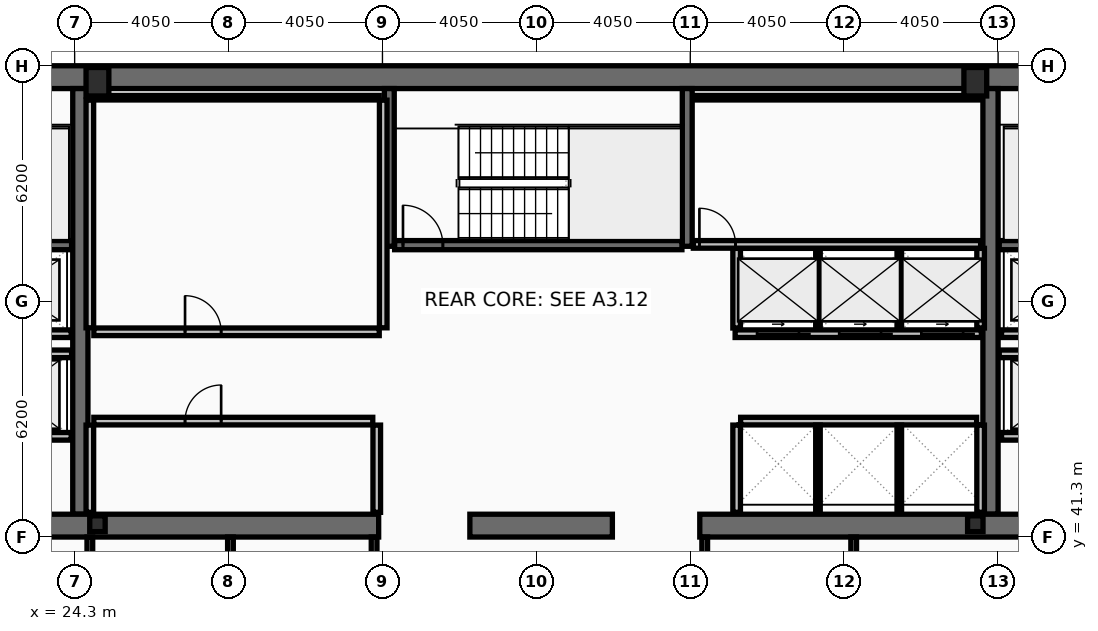
"""IFC4 building model, lengths in metres.
Left out: names, types, materials, properties, quantities, classifications, styles, units other than length and angle.
Written with IfcOpenShell. Run it as: python <this file> out.ifc"""

import sys

from ifc_helpers import new_model, si_unit, direction, frame, frame_2d, origin, origin_2d, place, context, subcontext, project, spatial, rectangle, hollow_rectangle, i_section, extrude, element, fill, save


model = new_model("IFC4")
c1 = context("Model", 3, precision=1e-05, world=origin(), true_north=direction((0.0, 1.0)))
c2 = subcontext(c1, "Body", "Model", "MODEL_VIEW")
j1 = project(units=[si_unit("LENGTHUNIT", "METRE"), si_unit("PLANEANGLEUNIT", "RADIAN")], contexts=[c1])
p1 = place(None, origin())
s1 = spatial("IfcSite", under=j1, at=p1, CompositionType="ELEMENT")
p2 = place(p1, origin())
s2 = spatial("IfcBuilding", under=s1, at=p2, CompositionType="ELEMENT")
p3 = place(p2, frame((0.0, 0.0, 228.2)))
s3 = spatial("IfcBuildingStorey", under=s2, at=p3, CompositionType="ELEMENT", Elevation=228.2)
p4 = place(p3, frame((16.2, 53.4, 0.0), z_axis=(0.0, 0.0, 1.0), x_axis=(1.0, 0.0, 0.0)))
e1 = element("IfcWall", 1, at=p4, inside=s3, PredefinedType="SHEAR", context=c2, shape_type="SweptSolid", body=[
    extrude(rectangle(XDim=40.5, YDim=0.6, at=frame_2d((20.25, 0.0))), origin(), (0.0, 0.0, 1.0), 3.44),
])
for number, where, z_axis, x_axis in (
    (2, (24.45, 41.9, 0.0), (0.0, 0.0, 1.0), (0.0, 1.0, 0.0)),
    (3, (48.4, 41.9, 0.0), (0.0, 0.0, 1.0), (0.0, 1.0, 0.0)),
):
    element("IfcWall", number, at=place(p3, frame(where, z_axis=z_axis, x_axis=x_axis)), inside=s3, PredefinedType="SHEAR", context=c2, shape_type="SweptSolid", body=[
        extrude(rectangle(XDim=11.2, YDim=0.4, at=frame_2d((5.6, 0.0))), origin(), (0.0, 0.0, 1.0), 3.44),
    ])
p5 = place(p3, frame((32.3, 41.6, 0.0), z_axis=(0.0, 0.0, 1.0), x_axis=(-1.0, 0.0, 0.0)))
e4 = element("IfcWall", 4, at=p5, inside=s3, PredefinedType="SHEAR", context=c2, shape_type="SweptSolid", body=[
    extrude(rectangle(XDim=11.45, YDim=0.6, at=frame_2d((5.725, 0.0))), origin(), (0.0, 0.0, 1.0), 3.44),
])
p6 = place(p3, frame((38.45, 41.6, 0.0), z_axis=(0.0, 0.0, 1.0), x_axis=(-1.0, 0.0, 0.0)))
e5 = element("IfcWall", 5, at=p6, inside=s3, PredefinedType="SHEAR", context=c2, shape_type="SweptSolid", body=[
    extrude(rectangle(XDim=3.75, YDim=0.6, at=frame_2d((1.875, 0.0))), origin(), (0.0, 0.0, 1.0), 3.44),
])
p7 = place(p3, frame((52.05, 41.6, 0.0), z_axis=(0.0, 0.0, 1.0), x_axis=(-1.0, 0.0, 0.0)))
e6 = element("IfcWall", 6, at=p7, inside=s3, PredefinedType="SHEAR", context=c2, shape_type="SweptSolid", body=[
    extrude(rectangle(XDim=11.3, YDim=0.6, at=frame_2d((5.65, 0.0))), origin(), (0.0, 0.0, 1.0), 3.44),
])
for number, where, z_axis, x_axis in (
    (7, (32.58, 48.95, 0.0), (0.0, 0.0, 1.0), (0.0, 1.0, 0.0)),
    (8, (40.42, 48.95, 0.0), (0.0, 0.0, 1.0), (0.0, 1.0, 0.0)),
):
    element("IfcWall", number, at=place(p3, frame(where, z_axis=z_axis, x_axis=x_axis)), inside=s3, PredefinedType="SHEAR", context=c2, shape_type="SweptSolid", body=[
        extrude(rectangle(XDim=4.15, YDim=0.26, at=frame_2d((2.075, 0.0))), origin(), (0.0, 0.0, 1.0), 3.44),
    ])
p8 = place(p3, frame((16.8, 48.98, 0.0), z_axis=(0.0, 0.0, 1.0), x_axis=(1.0, 0.0, 0.0)))
e9 = element("IfcWall", 9, at=p8, inside=s3, PredefinedType="SHEAR", context=c2, shape_type="SweptSolid", body=[
    extrude(rectangle(XDim=7.42, YDim=0.24, at=frame_2d((3.71, 0.0))), origin(), (0.0, 0.0, 1.0), 3.44),
])
p9 = place(p8, frame((0.22, 0.0, 0.0)))
e10 = element("IfcOpeningElement", 10, at=p9, cuts=e9, PredefinedType="OPENING", context=c2, shape_type="SweptSolid", body=[
    extrude(rectangle(XDim=1.05, YDim=2.15, at=frame_2d((0.525, 1.075))), frame((0.0, 0.13, 0.0), z_axis=(0.0, -1.0, 0.0), x_axis=(1.0, 0.0, 0.0)), (0.0, 0.0, 1.0), 0.26),
])
p10 = place(p3, frame((48.63, 48.98, 0.0), z_axis=(0.0, 0.0, 1.0), x_axis=(1.0, 0.0, 0.0)))
e11 = element("IfcWall", 11, at=p10, inside=s3, PredefinedType="SHEAR", context=c2, shape_type="SweptSolid", body=[
    extrude(rectangle(XDim=7.47, YDim=0.24, at=frame_2d((3.735, 0.0))), origin(), (0.0, 0.0, 1.0), 3.44),
])
p11 = place(p10, frame((6.2, 0.0, 0.0)))
e12 = element("IfcOpeningElement", 12, at=p11, cuts=e11, PredefinedType="OPENING", context=c2, shape_type="SweptSolid", body=[
    extrude(rectangle(XDim=1.05, YDim=2.15, at=frame_2d((0.525, 1.075))), frame((0.0, 0.13, 0.0), z_axis=(0.0, -1.0, 0.0), x_axis=(1.0, 0.0, 0.0)), (0.0, 0.0, 1.0), 0.26),
])
p12 = place(p3, frame((32.72, 48.98, 0.0), z_axis=(0.0, 0.0, 1.0), x_axis=(1.0, 0.0, 0.0)))
e13 = element("IfcWall", 13, at=p12, inside=s3, PredefinedType="SHEAR", context=c2, shape_type="SweptSolid", body=[
    extrude(rectangle(XDim=7.56, YDim=0.24, at=frame_2d((3.78, 0.0))), origin(), (0.0, 0.0, 1.0), 3.44),
])
p13 = place(p12, frame((0.22, 0.0, 0.0)))
e14 = element("IfcOpeningElement", 14, at=p13, cuts=e13, PredefinedType="OPENING", context=c2, shape_type="SweptSolid", body=[
    extrude(rectangle(XDim=1.05, YDim=2.15, at=frame_2d((0.525, 1.075))), frame((0.0, 0.13, 0.0), z_axis=(0.0, -1.0, 0.0), x_axis=(1.0, 0.0, 0.0)), (0.0, 0.0, 1.0), 0.26),
])
for number, where, z_axis, x_axis in (
    (15, (24.9, 53.28, 0.0), (0.0, 0.0, 1.0), (1.0, 0.0, 0.0)),
    (16, (48.0, 53.28, 0.0), (0.0, 0.0, 1.0), (1.0, 0.0, 0.0)),
):
    element("IfcColumn", number, at=place(p3, frame(where, z_axis=z_axis, x_axis=x_axis)), inside=s3, PredefinedType="COLUMN", context=c2, shape_type="SweptSolid", body=[
        extrude(hollow_rectangle(XDim=0.6, YDim=0.75, WallThickness=0.045, at=origin_2d()), origin(), (0.0, 0.0, 1.0), 3.6),
    ])
for number, where, z_axis, x_axis in (
    (17, (24.9, 41.65, 0.0), (0.0, 0.0, 1.0), (1.0, 0.0, 0.0)),
    (18, (48.0, 41.65, 0.0), (0.0, 0.0, 1.0), (1.0, 0.0, 0.0)),
):
    element("IfcColumn", number, at=place(p3, frame(where, z_axis=z_axis, x_axis=x_axis)), inside=s3, PredefinedType="COLUMN", context=c2, shape_type="SweptSolid", body=[
        extrude(i_section(OverallWidth=0.406, OverallDepth=0.416, WebThickness=0.03, FlangeThickness=0.048, at=origin_2d()), origin(), (0.0, 0.0, 1.0), 3.6),
    ])
p14 = place(p3, frame((51.61, 43.95, 0.0), z_axis=(0.0, 0.0, 1.0), x_axis=(-1.0, 0.0, 0.0)))
e19 = element("IfcWall", 19, at=p14, inside=s3, PredefinedType="PARTITIONING", context=c2, shape_type="SweptSolid", body=[
    extrude(rectangle(XDim=2.92, YDim=0.2, at=frame_2d((1.46, 0.0))), origin(), (0.0, 0.0, 1.0), 3.44),
])
p15 = place(p14, frame((0.81, 0.0, 0.0)))
e20 = element("IfcOpeningElement", 20, at=p15, cuts=e19, PredefinedType="OPENING", context=c2, shape_type="SweptSolid", body=[
    extrude(rectangle(XDim=1.3, YDim=2.18, at=frame_2d((0.65, 1.09))), frame((0.0, 0.11, 0.0), z_axis=(0.0, -1.0, 0.0), x_axis=(1.0, 0.0, 0.0)), (0.0, 0.0, 1.0), 0.22),
])
p16 = place(p3, frame((24.21, 43.95, 0.0), z_axis=(0.0, 0.0, 1.0), x_axis=(-1.0, 0.0, 0.0)))
e21 = element("IfcWall", 21, at=p16, inside=s3, PredefinedType="PARTITIONING", context=c2, shape_type="SweptSolid", body=[
    extrude(rectangle(XDim=2.97, YDim=0.2, at=frame_2d((1.485, 0.0))), origin(), (0.0, 0.0, 1.0), 3.44),
])
p17 = place(p16, frame((0.86, 0.0, 0.0)))
e22 = element("IfcOpeningElement", 22, at=p17, cuts=e21, PredefinedType="OPENING", context=c2, shape_type="SweptSolid", body=[
    extrude(rectangle(XDim=1.3, YDim=2.18, at=frame_2d((0.65, 1.09))), frame((0.0, 0.11, 0.0), z_axis=(0.0, -1.0, 0.0), x_axis=(1.0, 0.0, 0.0)), (0.0, 0.0, 1.0), 0.22),
])
p18 = place(p3, frame((51.61, 46.65, 0.0), z_axis=(0.0, 0.0, 1.0), x_axis=(-1.0, 0.0, 0.0)))
e23 = element("IfcWall", 23, at=p18, inside=s3, PredefinedType="PARTITIONING", context=c2, shape_type="SweptSolid", body=[
    extrude(rectangle(XDim=2.92, YDim=0.2, at=frame_2d((1.46, 0.0))), origin(), (0.0, 0.0, 1.0), 3.44),
])
p19 = place(p18, frame((0.86, 0.0, 0.0)))
e24 = element("IfcOpeningElement", 24, at=p19, cuts=e23, PredefinedType="OPENING", context=c2, shape_type="SweptSolid", body=[
    extrude(rectangle(XDim=1.2, YDim=2.18, at=frame_2d((0.6, 1.09))), frame((0.0, 0.11, 0.0), z_axis=(0.0, -1.0, 0.0), x_axis=(1.0, 0.0, 0.0)), (0.0, 0.0, 1.0), 0.22),
])
p20 = place(p3, frame((24.21, 46.65, 0.0), z_axis=(0.0, 0.0, 1.0), x_axis=(-1.0, 0.0, 0.0)))
e25 = element("IfcWall", 25, at=p20, inside=s3, PredefinedType="PARTITIONING", context=c2, shape_type="SweptSolid", body=[
    extrude(rectangle(XDim=2.97, YDim=0.2, at=frame_2d((1.485, 0.0))), origin(), (0.0, 0.0, 1.0), 3.44),
])
p21 = place(p20, frame((0.91, 0.0, 0.0)))
e26 = element("IfcOpeningElement", 26, at=p21, cuts=e25, PredefinedType="OPENING", context=c2, shape_type="SweptSolid", body=[
    extrude(rectangle(XDim=1.2, YDim=2.18, at=frame_2d((0.6, 1.09))), frame((0.0, 0.11, 0.0), z_axis=(0.0, -1.0, 0.0), x_axis=(1.0, 0.0, 0.0)), (0.0, 0.0, 1.0), 0.22),
])
p22 = place(p3, frame((48.16, 46.65, 0.0), z_axis=(0.0, 0.0, 1.0), x_axis=(-1.0, 0.0, 0.0)))
e27 = element("IfcWall", 27, at=p22, inside=s3, PredefinedType="PARTITIONING", context=c2, shape_type="SweptSolid", body=[
    extrude(rectangle(XDim=6.48, YDim=0.2, at=frame_2d((3.24, 0.0))), origin(), (0.0, 0.0, 1.0), 3.44),
])
p23 = place(p22, frame((4.8, 0.0, 0.0)))
e28 = element("IfcOpeningElement", 28, at=p23, cuts=e27, PredefinedType="OPENING", context=c2, shape_type="SweptSolid", body=[
    extrude(rectangle(XDim=1.1, YDim=2.18, at=frame_2d((0.55, 1.09))), frame((0.0, 0.11, 0.0), z_axis=(0.0, -1.0, 0.0), x_axis=(1.0, 0.0, 0.0)), (0.0, 0.0, 1.0), 0.22),
])
p24 = place(p22, frame((2.64, 0.0, 0.0)))
e29 = element("IfcOpeningElement", 29, at=p24, cuts=e27, PredefinedType="OPENING", context=c2, shape_type="SweptSolid", body=[
    extrude(rectangle(XDim=1.1, YDim=2.18, at=frame_2d((0.55, 1.09))), frame((0.0, 0.11, 0.0), z_axis=(0.0, -1.0, 0.0), x_axis=(1.0, 0.0, 0.0)), (0.0, 0.0, 1.0), 0.22),
])
p25 = place(p22, frame((0.48, 0.0, 0.0)))
e30 = element("IfcOpeningElement", 30, at=p25, cuts=e27, PredefinedType="OPENING", context=c2, shape_type="SweptSolid", body=[
    extrude(rectangle(XDim=1.1, YDim=2.18, at=frame_2d((0.55, 1.09))), frame((0.0, 0.11, 0.0), z_axis=(0.0, -1.0, 0.0), x_axis=(1.0, 0.0, 0.0)), (0.0, 0.0, 1.0), 0.22),
])
p26 = place(p3, frame((21.2, 46.12, 0.0), z_axis=(0.0, 0.0, 1.0), x_axis=(1.0, 0.0, 0.0)))
e31 = element("IfcWall", 31, at=p26, inside=s3, PredefinedType="PARTITIONING", context=c2, shape_type="SweptSolid", body=[
    extrude(rectangle(XDim=3.02, YDim=0.2, at=frame_2d((1.51, 0.0))), origin(), (0.0, 0.0, 1.0), 3.44),
])
p27 = place(p3, frame((48.63, 46.12, 0.0), z_axis=(0.0, 0.0, 1.0), x_axis=(1.0, 0.0, 0.0)))
e32 = element("IfcWall", 32, at=p27, inside=s3, PredefinedType="PARTITIONING", context=c2, shape_type="SweptSolid", body=[
    extrude(rectangle(XDim=3.07, YDim=0.2, at=frame_2d((1.535, 0.0))), origin(), (0.0, 0.0, 1.0), 3.44),
])
for number, where, z_axis, x_axis in (
    (33, (24.7, 46.805, 0.0), (0.0, 0.0, 1.0), (0.0, 1.0, 0.0)),
    (34, (32.42, 46.805, 0.0), (0.0, 0.0, 1.0), (0.0, 1.0, 0.0)),
):
    element("IfcWall", number, at=place(p3, frame(where, z_axis=z_axis, x_axis=x_axis)), inside=s3, PredefinedType="PARTITIONING", context=c2, shape_type="SweptSolid", body=[
        extrude(rectangle(XDim=5.99, YDim=0.2, at=frame_2d((2.995, 0.0))), origin(), (0.0, 0.0, 1.0), 3.44),
    ])
p28 = place(p3, frame((24.805, 52.86, 0.0), z_axis=(0.0, 0.0, 1.0), x_axis=(1.0, 0.0, 0.0)))
e35 = element("IfcWall", 35, at=p28, inside=s3, PredefinedType="PARTITIONING", context=c2, shape_type="SweptSolid", body=[
    extrude(rectangle(XDim=7.51, YDim=0.12, at=frame_2d((3.755, 0.0))), origin(), (0.0, 0.0, 1.0), 3.44),
])
p29 = place(p3, frame((24.805, 46.7, 0.0), z_axis=(0.0, 0.0, 1.0), x_axis=(1.0, 0.0, 0.0)))
e36 = element("IfcWall", 36, at=p29, inside=s3, PredefinedType="PARTITIONING", context=c2, shape_type="SweptSolid", body=[
    extrude(rectangle(XDim=7.51, YDim=0.2, at=frame_2d((3.755, 0.0))), origin(), (0.0, 0.0, 1.0), 3.44),
])
p30 = place(p29, frame((2.4, 0.0, 0.0)))
e37 = element("IfcOpeningElement", 37, at=p30, cuts=e36, PredefinedType="OPENING", context=c2, shape_type="SweptSolid", body=[
    extrude(rectangle(XDim=0.95, YDim=2.1, at=frame_2d((0.475, 1.05))), frame((0.0, 0.11, 0.0), z_axis=(0.0, -1.0, 0.0), x_axis=(1.0, 0.0, 0.0)), (0.0, 0.0, 1.0), 0.22),
])
for number, where, z_axis, x_axis in (
    (38, (24.7, 41.95, 0.0), (0.0, 0.0, 1.0), (0.0, 1.0, 0.0)),
    (39, (32.25, 41.95, 0.0), (0.0, 0.0, 1.0), (0.0, 1.0, 0.0)),
):
    element("IfcWall", number, at=place(p3, frame(where, z_axis=z_axis, x_axis=x_axis)), inside=s3, PredefinedType="PARTITIONING", context=c2, shape_type="SweptSolid", body=[
        extrude(rectangle(XDim=2.295, YDim=0.2, at=frame_2d((1.147, 0.0))), origin(), (0.0, 0.0, 1.0), 3.44),
    ])
p31 = place(p3, frame((24.805, 44.35, 0.0), z_axis=(0.0, 0.0, 1.0), x_axis=(1.0, 0.0, 0.0)))
e40 = element("IfcWall", 40, at=p31, inside=s3, PredefinedType="PARTITIONING", context=c2, shape_type="SweptSolid", body=[
    extrude(rectangle(XDim=7.34, YDim=0.2, at=frame_2d((3.67, 0.0))), origin(), (0.0, 0.0, 1.0), 3.44),
])
p32 = place(p31, frame((2.4, 0.0, 0.0)))
e41 = element("IfcOpeningElement", 41, at=p32, cuts=e40, PredefinedType="OPENING", context=c2, shape_type="SweptSolid", body=[
    extrude(rectangle(XDim=0.95, YDim=2.1, at=frame_2d((0.475, 1.05))), frame((0.0, 0.11, 0.0), z_axis=(0.0, -1.0, 0.0), x_axis=(1.0, 0.0, 0.0)), (0.0, 0.0, 1.0), 0.22),
])
for number, where, z_axis, x_axis in (
    (42, (41.72, 46.8, 0.0), (0.0, 0.0, 1.0), (0.0, 1.0, 0.0)),
    (43, (48.14, 46.8, 0.0), (0.0, 0.0, 1.0), (0.0, 1.0, 0.0)),
):
    element("IfcWall", number, at=place(p3, frame(where, z_axis=z_axis, x_axis=x_axis)), inside=s3, PredefinedType="PARTITIONING", context=c2, shape_type="SweptSolid", body=[
        extrude(rectangle(XDim=2.095, YDim=0.2, at=frame_2d((1.047, 0.0))), origin(), (0.0, 0.0, 1.0), 3.44),
    ])
for number, where, z_axis, x_axis in (
    (44, (43.86, 46.8, 0.0), (0.0, 0.0, 1.0), (0.0, 1.0, 0.0)),
    (45, (46.0, 46.8, 0.0), (0.0, 0.0, 1.0), (0.0, 1.0, 0.0)),
):
    element("IfcWall", number, at=place(p3, frame(where, z_axis=z_axis, x_axis=x_axis)), inside=s3, PredefinedType="PARTITIONING", context=c2, shape_type="SweptSolid", body=[
        extrude(rectangle(XDim=2.095, YDim=0.12, at=frame_2d((1.047, 0.0))), origin(), (0.0, 0.0, 1.0), 3.44),
    ])
p33 = place(p3, frame((41.825, 44.35, 0.0), z_axis=(0.0, 0.0, 1.0), x_axis=(1.0, 0.0, 0.0)))
e46 = element("IfcWall", 46, at=p33, inside=s3, PredefinedType="PARTITIONING", context=c2, shape_type="SweptSolid", body=[
    extrude(rectangle(XDim=6.21, YDim=0.2, at=frame_2d((3.105, 0.0))), origin(), (0.0, 0.0, 1.0), 3.44),
])
for number, where, z_axis, x_axis in (
    (47, (41.72, 41.95, 0.0), (0.0, 0.0, 1.0), (0.0, 1.0, 0.0)),
    (48, (48.14, 41.95, 0.0), (0.0, 0.0, 1.0), (0.0, 1.0, 0.0)),
):
    element("IfcWall", number, at=place(p3, frame(where, z_axis=z_axis, x_axis=x_axis)), inside=s3, PredefinedType="PARTITIONING", context=c2, shape_type="SweptSolid", body=[
        extrude(rectangle(XDim=2.295, YDim=0.2, at=frame_2d((1.147, 0.0))), origin(), (0.0, 0.0, 1.0), 3.44),
    ])
for number, where, z_axis, x_axis in (
    (49, (43.86, 41.95, 0.0), (0.0, 0.0, 1.0), (0.0, 1.0, 0.0)),
    (50, (46.0, 41.95, 0.0), (0.0, 0.0, 1.0), (0.0, 1.0, 0.0)),
):
    element("IfcWall", number, at=place(p3, frame(where, z_axis=z_axis, x_axis=x_axis)), inside=s3, PredefinedType="PARTITIONING", context=c2, shape_type="SweptSolid", body=[
        extrude(rectangle(XDim=2.295, YDim=0.12, at=frame_2d((1.147, 0.0))), origin(), (0.0, 0.0, 1.0), 3.44),
    ])
p34 = place(p3, frame((40.58, 52.86, 0.0), z_axis=(0.0, 0.0, 1.0), x_axis=(1.0, 0.0, 0.0)))
e51 = element("IfcWall", 51, at=p34, inside=s3, PredefinedType="PARTITIONING", context=c2, shape_type="SweptSolid", body=[
    extrude(rectangle(XDim=7.56, YDim=0.12, at=frame_2d((3.78, 0.0))), origin(), (0.0, 0.0, 1.0), 3.44),
])
p35 = place(p3, frame((40.58, 49.0, 0.0), z_axis=(0.0, 0.0, 1.0), x_axis=(1.0, 0.0, 0.0)))
e52 = element("IfcWall", 52, at=p35, inside=s3, PredefinedType="PARTITIONING", context=c2, shape_type="SweptSolid", body=[
    extrude(rectangle(XDim=7.56, YDim=0.2, at=frame_2d((3.78, 0.0))), origin(), (0.0, 0.0, 1.0), 3.44),
])
p36 = place(p35, frame((0.16, 0.0, 0.0)))
e53 = element("IfcOpeningElement", 53, at=p36, cuts=e52, PredefinedType="OPENING", context=c2, shape_type="SweptSolid", body=[
    extrude(rectangle(XDim=0.95, YDim=2.1, at=frame_2d((0.475, 1.05))), frame((0.0, 0.11, 0.0), z_axis=(0.0, -1.0, 0.0), x_axis=(1.0, 0.0, 0.0)), (0.0, 0.0, 1.0), 0.22),
])
p37 = place(p3, frame((24.7, 38.28, 0.0), z_axis=(0.0, 0.0, 1.0), x_axis=(0.0, 1.0, 0.0)))
e54 = element("IfcWall", 54, at=p37, inside=s3, PredefinedType="PARTITIONING", context=c2, shape_type="SweptSolid", body=[
    extrude(rectangle(XDim=3.02, YDim=0.15, at=frame_2d((1.51, 0.0))), origin(), (0.0, 0.0, 1.0), 2.78),
])
for number, where, z_axis, x_axis in (
    (55, (28.4, 38.28, 0.0), (0.0, 0.0, 1.0), (0.0, 1.0, 0.0)),
    (56, (32.18, 38.28, 0.0), (0.0, 0.0, 1.0), (0.0, 1.0, 0.0)),
    (57, (40.88, 38.28, 0.0), (0.0, 0.0, 1.0), (0.0, 1.0, 0.0)),
    (58, (44.8, 38.28, 0.0), (0.0, 0.0, 1.0), (0.0, 1.0, 0.0)),
):
    element("IfcWall", number, at=place(p3, frame(where, z_axis=z_axis, x_axis=x_axis)), inside=s3, PredefinedType="PARTITIONING", context=c2, shape_type="SweptSolid", body=[
        extrude(rectangle(XDim=3.02, YDim=0.15, at=frame_2d((1.51, 0.0))), origin(), (0.0, 0.0, 1.0), 3.44),
    ])
p38 = place(p13, origin())
e59 = element("IfcDoor", 59, at=p38, inside=s3, OperationType="SINGLE_SWING_LEFT", PredefinedType="DOOR", context=c2, shape_type="SweptSolid", body=[
    extrude(rectangle(XDim=1.05, YDim=2.15, at=frame_2d((0.525, 1.075))), frame((0.0, 0.025, 0.0), z_axis=(0.0, -1.0, 0.0), x_axis=(1.0, 0.0, 0.0)), (0.0, 0.0, 1.0), 0.05),
])
fill(e14, e59)
p39 = place(p23, origin())
e60 = element("IfcDoor", 60, at=p39, inside=s3, OperationType="SLIDING_TO_LEFT", PredefinedType="DOOR", context=c2, shape_type="SweptSolid", body=[
    extrude(rectangle(XDim=1.1, YDim=2.18, at=frame_2d((0.55, 1.09))), frame((0.0, 0.025, 0.0), z_axis=(0.0, -1.0, 0.0), x_axis=(1.0, 0.0, 0.0)), (0.0, 0.0, 1.0), 0.05),
])
fill(e28, e60)
p40 = place(p24, origin())
e61 = element("IfcDoor", 61, at=p40, inside=s3, OperationType="SLIDING_TO_LEFT", PredefinedType="DOOR", context=c2, shape_type="SweptSolid", body=[
    extrude(rectangle(XDim=1.1, YDim=2.18, at=frame_2d((0.55, 1.09))), frame((0.0, 0.025, 0.0), z_axis=(0.0, -1.0, 0.0), x_axis=(1.0, 0.0, 0.0)), (0.0, 0.0, 1.0), 0.05),
])
fill(e29, e61)
p41 = place(p25, origin())
e62 = element("IfcDoor", 62, at=p41, inside=s3, OperationType="SLIDING_TO_LEFT", PredefinedType="DOOR", context=c2, shape_type="SweptSolid", body=[
    extrude(rectangle(XDim=1.1, YDim=2.18, at=frame_2d((0.55, 1.09))), frame((0.0, 0.025, 0.0), z_axis=(0.0, -1.0, 0.0), x_axis=(1.0, 0.0, 0.0)), (0.0, 0.0, 1.0), 0.05),
])
fill(e30, e62)
p42 = place(p30, origin())
e63 = element("IfcDoor", 63, at=p42, inside=s3, OperationType="SINGLE_SWING_LEFT", PredefinedType="DOOR", context=c2, shape_type="SweptSolid", body=[
    extrude(rectangle(XDim=0.95, YDim=2.1, at=frame_2d((0.475, 1.05))), frame((0.0, 0.025, 0.0), z_axis=(0.0, -1.0, 0.0), x_axis=(1.0, 0.0, 0.0)), (0.0, 0.0, 1.0), 0.05),
])
fill(e37, e63)
p43 = place(p32, origin())
e64 = element("IfcDoor", 64, at=p43, inside=s3, OperationType="SINGLE_SWING_RIGHT", PredefinedType="DOOR", context=c2, shape_type="SweptSolid", body=[
    extrude(rectangle(XDim=0.95, YDim=2.1, at=frame_2d((0.475, 1.05))), frame((0.0, 0.025, 0.0), z_axis=(0.0, -1.0, 0.0), x_axis=(1.0, 0.0, 0.0)), (0.0, 0.0, 1.0), 0.05),
])
fill(e41, e64)
p44 = place(p36, origin())
e65 = element("IfcDoor", 65, at=p44, inside=s3, OperationType="SINGLE_SWING_LEFT", PredefinedType="DOOR", context=c2, shape_type="SweptSolid", body=[
    extrude(rectangle(XDim=0.95, YDim=2.1, at=frame_2d((0.475, 1.05))), frame((0.0, 0.025, 0.0), z_axis=(0.0, -1.0, 0.0), x_axis=(1.0, 0.0, 0.0)), (0.0, 0.0, 1.0), 0.05),
])
fill(e53, e65)
save(model, sys.argv[1])
